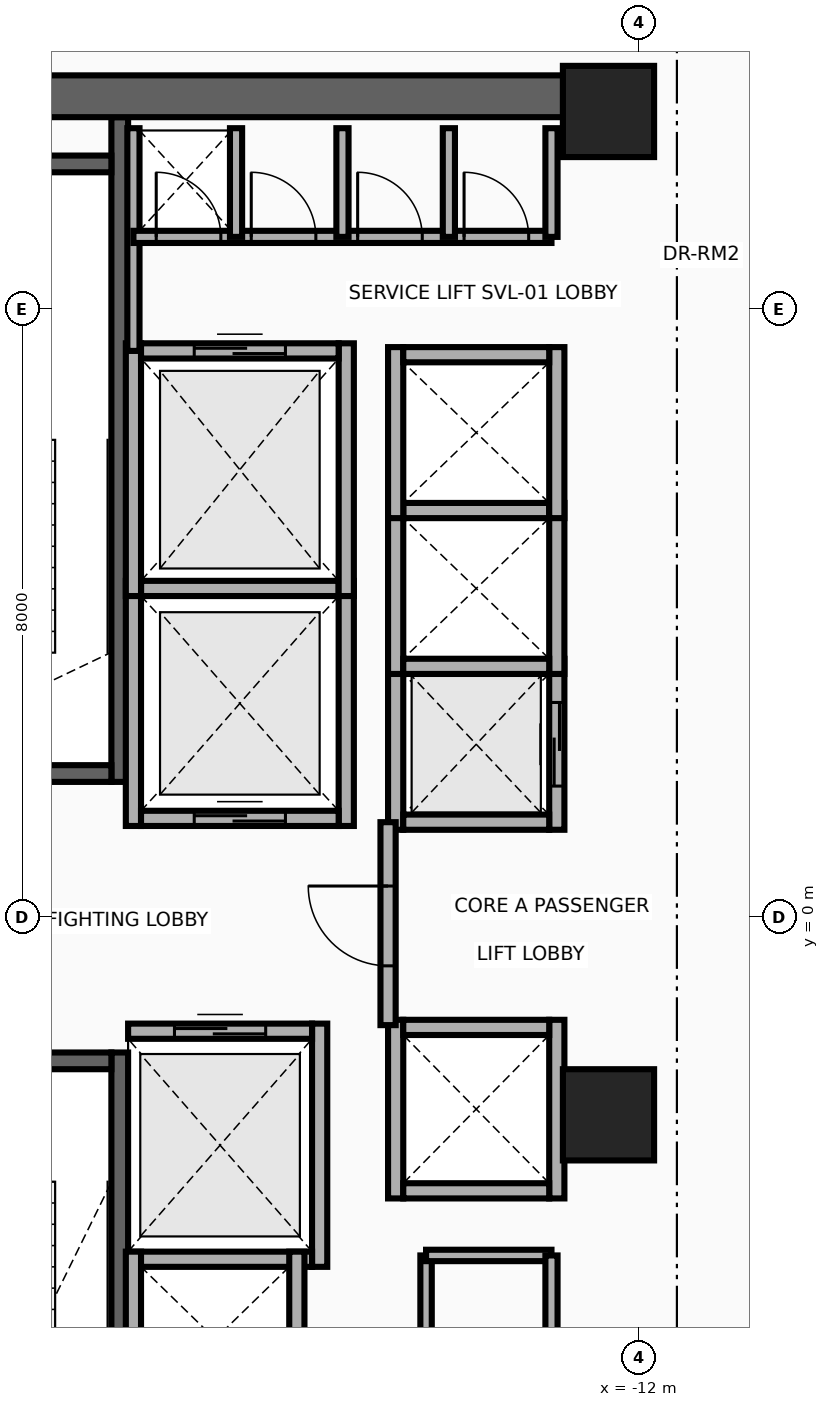
"""IFC4 building model, lengths in metres.
Left out: names, types, materials, properties, quantities, classifications, styles, units other than length and angle.
Written with IfcOpenShell. Run it as: python <this file> out.ifc"""

import sys

from ifc_helpers import new_model, si_unit, direction, frame, frame_2d, origin, origin_2d, place, context, subcontext, project, spatial, rectangle, extrude, source, transform, mapped, element, fill, save


model = new_model("IFC4")
c1 = context("Model", 3, precision=1e-05, world=origin(), true_north=direction((0.0, 1.0)))
c2 = subcontext(c1, "Body", "Model", "MODEL_VIEW")
j1 = project(units=[si_unit("LENGTHUNIT", "METRE"), si_unit("PLANEANGLEUNIT", "RADIAN")], contexts=[c1])
p1 = place(None, origin())
s1 = spatial("IfcSite", under=j1, at=p1, CompositionType="ELEMENT")
p2 = place(p1, origin())
s2 = spatial("IfcBuilding", under=s1, at=p2, CompositionType="ELEMENT")
p3 = place(p2, frame((0.0, 0.0, 168.6)))
s3 = spatial("IfcBuildingStorey", under=s2, at=p3, CompositionType="ELEMENT", Elevation=168.6)
p4 = place(p3, frame((-18.83, 1.78, 0.0), z_axis=(0.0, 0.0, 1.0), x_axis=(0.0, 1.0, 0.0)))
e1 = element("IfcWall", 1, at=p4, inside=s3, PredefinedType="SHEAR", context=c2, shape_type="SweptSolid", body=[
    extrude(rectangle(XDim=8.745, YDim=0.22, at=frame_2d((4.373, 0.0))), origin(), (0.0, 0.0, 1.0), 3.3),
])
p5 = place(p3, frame((-22.05, 1.89, 0.0), z_axis=(0.0, 0.0, 1.0), x_axis=(1.0, 0.0, 0.0)))
e2 = element("IfcWall", 2, at=p5, inside=s3, PredefinedType="SHEAR", context=c2, shape_type="SweptSolid", body=[
    extrude(rectangle(XDim=3.11, YDim=0.22, at=frame_2d((1.555, 0.0))), origin(), (0.0, 0.0, 1.0), 3.3),
])
p6 = place(p5, frame((1.0, 0.0, 0.0)))
e3 = element("IfcOpeningElement", 3, at=p6, cuts=e2, PredefinedType="OPENING", context=c2, shape_type="SweptSolid", body=[
    extrude(rectangle(XDim=1.1, YDim=2.15, at=frame_2d((0.55, 1.075))), frame((0.0, 0.125, 0.0), z_axis=(0.0, -1.0, 0.0), x_axis=(1.0, 0.0, 0.0)), (0.0, 0.0, 1.0), 0.25),
])
p7 = place(p3, frame((-22.05, 9.91, 0.0), z_axis=(0.0, 0.0, 1.0), x_axis=(1.0, 0.0, 0.0)))
e4 = element("IfcWall", 4, at=p7, inside=s3, PredefinedType="SHEAR", context=c2, shape_type="SweptSolid", body=[
    extrude(rectangle(XDim=3.11, YDim=0.22, at=frame_2d((1.555, 0.0))), origin(), (0.0, 0.0, 1.0), 3.3),
])
p8 = place(p3, frame((-18.83, -10.525, 0.0), z_axis=(0.0, 0.0, 1.0), x_axis=(0.0, 1.0, 0.0)))
e5 = element("IfcWall", 5, at=p8, inside=s3, PredefinedType="SHEAR", context=c2, shape_type="SweptSolid", body=[
    extrude(rectangle(XDim=8.745, YDim=0.22, at=frame_2d((4.373, 0.0))), origin(), (0.0, 0.0, 1.0), 3.3),
])
p9 = place(p3, frame((-22.05, -1.89, 0.0), z_axis=(0.0, 0.0, 1.0), x_axis=(1.0, 0.0, 0.0)))
e6 = element("IfcWall", 6, at=p9, inside=s3, PredefinedType="SHEAR", context=c2, shape_type="SweptSolid", body=[
    extrude(rectangle(XDim=3.11, YDim=0.22, at=frame_2d((1.555, 0.0))), origin(), (0.0, 0.0, 1.0), 3.3),
])
p10 = place(p9, frame((1.0, 0.0, 0.0)))
e7 = element("IfcOpeningElement", 7, at=p10, cuts=e6, PredefinedType="OPENING", context=c2, shape_type="SweptSolid", body=[
    extrude(rectangle(XDim=1.1, YDim=2.15, at=frame_2d((0.55, 1.075))), frame((0.0, 0.125, 0.0), z_axis=(0.0, -1.0, 0.0), x_axis=(1.0, 0.0, 0.0)), (0.0, 0.0, 1.0), 0.25),
])
p11 = place(p3, frame((-22.65, 10.8, 0.0), z_axis=(0.0, 0.0, 1.0), x_axis=(1.0, 0.0, 0.0)))
e8 = element("IfcWall", 8, at=p11, inside=s3, PredefinedType="SHEAR", context=c2, shape_type="SweptSolid", body=[
    extrude(rectangle(XDim=10.25, YDim=0.55, at=frame_2d((5.125, 0.0))), origin(), (0.0, 0.0, 1.0), 3.3),
])
m1 = source(origin(), c2, "Body", "SweptSolid", [
    extrude(rectangle(XDim=1.2, YDim=1.2, at=origin_2d()), origin(), (0.0, 0.0, 1.0), 3.7),
])
for number, where, z_axis, x_axis in (
    (9, (-12.4, -2.6, 0.0), (0.0, 0.0, 1.0), (1.0, 0.0, 0.0)),
    (10, (-12.4, 10.6, 0.0), (0.0, 0.0, 1.0), (1.0, 0.0, 0.0)),
):
    element("IfcColumn", number, at=place(p3, frame(where, z_axis=z_axis, x_axis=x_axis)), inside=s3, PredefinedType="COLUMN", context=c2, shape_type="MappedRepresentation", body=[
        mapped(m1, transform((0.0, 0.0, 0.0), x_axis=(1.0, 0.0, 0.0), y_axis=(0.0, 1.0, 0.0), z_axis=(0.0, 0.0, 1.0), scale=1.0)),
    ])
for number, where, z_axis, x_axis in (
    (11, (-18.65, 1.2, 0.0), (0.0, 0.0, 1.0), (0.0, 1.0, 0.0)),
    (12, (-15.85, 1.2, 0.0), (0.0, 0.0, 1.0), (0.0, 1.0, 0.0)),
):
    element("IfcWall", number, at=place(p3, frame(where, z_axis=z_axis, x_axis=x_axis)), inside=s3, PredefinedType="MOVABLE", context=c2, shape_type="SweptSolid", body=[
        extrude(rectangle(XDim=3.225, YDim=0.2, at=frame_2d((1.613, 0.0))), origin(), (0.0, 0.0, 1.0), 3.3),
    ])
p12 = place(p3, frame((-18.55, 1.3, 0.0), z_axis=(0.0, 0.0, 1.0), x_axis=(1.0, 0.0, 0.0)))
e13 = element("IfcWall", 13, at=p12, inside=s3, PredefinedType="MOVABLE", context=c2, shape_type="SweptSolid", body=[
    extrude(rectangle(XDim=2.6, YDim=0.2, at=frame_2d((1.3, 0.0))), origin(), (0.0, 0.0, 1.0), 3.3),
])
p13 = place(p12, frame((0.7, 0.0, 0.0)))
e14 = element("IfcOpeningElement", 14, at=p13, cuts=e13, PredefinedType="OPENING", context=c2, shape_type="SweptSolid", body=[
    extrude(rectangle(XDim=1.2, YDim=2.1, at=frame_2d((0.6, 1.05))), frame((0.0, 0.115, 0.0), z_axis=(0.0, -1.0, 0.0), x_axis=(1.0, 0.0, 0.0)), (0.0, 0.0, 1.0), 0.23),
])
p14 = place(p3, frame((-18.55, 4.325, 0.0), z_axis=(0.0, 0.0, 1.0), x_axis=(1.0, 0.0, 0.0)))
e15 = element("IfcWall", 15, at=p14, inside=s3, PredefinedType="MOVABLE", context=c2, shape_type="SweptSolid", body=[
    extrude(rectangle(XDim=2.6, YDim=0.2, at=frame_2d((1.3, 0.0))), origin(), (0.0, 0.0, 1.0), 3.3),
])
p15 = place(p3, frame((-16.2, -4.6, 0.0), z_axis=(0.0, 0.0, 1.0), x_axis=(0.0, 1.0, 0.0)))
e16 = element("IfcWall", 16, at=p15, inside=s3, PredefinedType="MOVABLE", context=c2, shape_type="SweptSolid", body=[
    extrude(rectangle(XDim=3.2, YDim=0.2, at=frame_2d((1.6, 0.0))), origin(), (0.0, 0.0, 1.0), 3.3),
])
p16 = place(p3, frame((-18.72, -4.5, 0.0), z_axis=(0.0, 0.0, 1.0), x_axis=(1.0, 0.0, 0.0)))
e17 = element("IfcWall", 17, at=p16, inside=s3, PredefinedType="MOVABLE", context=c2, shape_type="SweptSolid", body=[
    extrude(rectangle(XDim=2.42, YDim=0.2, at=frame_2d((1.21, 0.0))), origin(), (0.0, 0.0, 1.0), 3.3),
])
p17 = place(p3, frame((-18.72, -1.5, 0.0), z_axis=(0.0, 0.0, 1.0), x_axis=(1.0, 0.0, 0.0)))
e18 = element("IfcWall", 18, at=p17, inside=s3, PredefinedType="MOVABLE", context=c2, shape_type="SweptSolid", body=[
    extrude(rectangle(XDim=2.42, YDim=0.2, at=frame_2d((1.21, 0.0))), origin(), (0.0, 0.0, 1.0), 3.3),
])
p18 = place(p17, frame((0.61, 0.0, 0.0)))
e19 = element("IfcOpeningElement", 19, at=p18, cuts=e18, PredefinedType="OPENING", context=c2, shape_type="SweptSolid", body=[
    extrude(rectangle(XDim=1.2, YDim=2.1, at=frame_2d((0.6, 1.05))), frame((0.0, 0.115, 0.0), z_axis=(0.0, -1.0, 0.0), x_axis=(1.0, 0.0, 0.0)), (0.0, 0.0, 1.0), 0.23),
])
for number, where, z_axis, x_axis in (
    (20, (-18.65, 4.225, 0.0), (0.0, 0.0, 1.0), (0.0, 1.0, 0.0)),
    (21, (-15.85, 4.225, 0.0), (0.0, 0.0, 1.0), (0.0, 1.0, 0.0)),
):
    element("IfcWall", number, at=place(p3, frame(where, z_axis=z_axis, x_axis=x_axis)), inside=s3, PredefinedType="MOVABLE", context=c2, shape_type="SweptSolid", body=[
        extrude(rectangle(XDim=3.325, YDim=0.2, at=frame_2d((1.663, 0.0))), origin(), (0.0, 0.0, 1.0), 3.3),
    ])
p19 = place(p3, frame((-18.55, 7.45, 0.0), z_axis=(0.0, 0.0, 1.0), x_axis=(1.0, 0.0, 0.0)))
e22 = element("IfcWall", 22, at=p19, inside=s3, PredefinedType="MOVABLE", context=c2, shape_type="SweptSolid", body=[
    extrude(rectangle(XDim=2.6, YDim=0.2, at=frame_2d((1.3, 0.0))), origin(), (0.0, 0.0, 1.0), 3.3),
])
p20 = place(p19, frame((0.7, 0.0, 0.0)))
e23 = element("IfcOpeningElement", 23, at=p20, cuts=e22, PredefinedType="OPENING", context=c2, shape_type="SweptSolid", body=[
    extrude(rectangle(XDim=1.2, YDim=2.1, at=frame_2d((0.6, 1.05))), frame((0.0, 0.115, 0.0), z_axis=(0.0, -1.0, 0.0), x_axis=(1.0, 0.0, 0.0)), (0.0, 0.0, 1.0), 0.23),
])
p21 = place(p3, frame((-15.2, 1.15, 0.0), z_axis=(0.0, 0.0, 1.0), x_axis=(0.0, 1.0, 0.0)))
e24 = element("IfcWall", 24, at=p21, inside=s3, PredefinedType="MOVABLE", context=c2, shape_type="SweptSolid", body=[
    extrude(rectangle(XDim=2.25, YDim=0.2, at=frame_2d((1.125, 0.0))), origin(), (0.0, 0.0, 1.0), 3.3),
])
p22 = place(p3, frame((-13.08, 1.15, 0.0), z_axis=(0.0, 0.0, 1.0), x_axis=(0.0, 1.0, 0.0)))
e25 = element("IfcWall", 25, at=p22, inside=s3, PredefinedType="MOVABLE", context=c2, shape_type="SweptSolid", body=[
    extrude(rectangle(XDim=2.25, YDim=0.2, at=frame_2d((1.125, 0.0))), origin(), (0.0, 0.0, 1.0), 3.3),
])
p23 = place(p22, frame((0.575, 0.0, 0.0)))
e26 = element("IfcOpeningElement", 26, at=p23, cuts=e25, PredefinedType="OPENING", context=c2, shape_type="SweptSolid", body=[
    extrude(rectangle(XDim=1.1, YDim=2.1, at=frame_2d((0.55, 1.05))), frame((0.0, 0.115, 0.0), z_axis=(0.0, -1.0, 0.0), x_axis=(1.0, 0.0, 0.0)), (0.0, 0.0, 1.0), 0.23),
])
p24 = place(p3, frame((-15.1, 1.25, 0.0), z_axis=(0.0, 0.0, 1.0), x_axis=(1.0, 0.0, 0.0)))
e27 = element("IfcWall", 27, at=p24, inside=s3, PredefinedType="MOVABLE", context=c2, shape_type="SweptSolid", body=[
    extrude(rectangle(XDim=1.92, YDim=0.2, at=frame_2d((0.96, 0.0))), origin(), (0.0, 0.0, 1.0), 3.3),
])
for number, where, z_axis, x_axis in (
    (28, (-15.2, 3.2, 0.0), (0.0, 0.0, 1.0), (0.0, 1.0, 0.0)),
    (29, (-13.08, 3.2, 0.0), (0.0, 0.0, 1.0), (0.0, 1.0, 0.0)),
):
    element("IfcWall", number, at=place(p3, frame(where, z_axis=z_axis, x_axis=x_axis)), inside=s3, PredefinedType="MOVABLE", context=c2, shape_type="SweptSolid", body=[
        extrude(rectangle(XDim=2.25, YDim=0.2, at=frame_2d((1.125, 0.0))), origin(), (0.0, 0.0, 1.0), 3.3),
    ])
for number, where, z_axis, x_axis in (
    (30, (-15.1, 3.3, 0.0), (0.0, 0.0, 1.0), (1.0, 0.0, 0.0)),
    (31, (-15.1, 5.35, 0.0), (0.0, 0.0, 1.0), (1.0, 0.0, 0.0)),
):
    element("IfcWall", number, at=place(p3, frame(where, z_axis=z_axis, x_axis=x_axis)), inside=s3, PredefinedType="MOVABLE", context=c2, shape_type="SweptSolid", body=[
        extrude(rectangle(XDim=1.92, YDim=0.2, at=frame_2d((0.96, 0.0))), origin(), (0.0, 0.0, 1.0), 3.3),
    ])
for number, where, z_axis, x_axis in (
    (32, (-15.2, 5.25, 0.0), (0.0, 0.0, 1.0), (0.0, 1.0, 0.0)),
    (33, (-13.08, 5.25, 0.0), (0.0, 0.0, 1.0), (0.0, 1.0, 0.0)),
):
    element("IfcWall", number, at=place(p3, frame(where, z_axis=z_axis, x_axis=x_axis)), inside=s3, PredefinedType="MOVABLE", context=c2, shape_type="SweptSolid", body=[
        extrude(rectangle(XDim=2.25, YDim=0.2, at=frame_2d((1.125, 0.0))), origin(), (0.0, 0.0, 1.0), 3.3),
    ])
p25 = place(p3, frame((-15.1, 7.4, 0.0), z_axis=(0.0, 0.0, 1.0), x_axis=(1.0, 0.0, 0.0)))
e34 = element("IfcWall", 34, at=p25, inside=s3, PredefinedType="MOVABLE", context=c2, shape_type="SweptSolid", body=[
    extrude(rectangle(XDim=1.92, YDim=0.2, at=frame_2d((0.96, 0.0))), origin(), (0.0, 0.0, 1.0), 3.3),
])
for number, where, z_axis, x_axis in (
    (35, (-18.65, -6.7, 0.0), (0.0, 0.0, 1.0), (0.0, 1.0, 0.0)),
    (36, (-16.5, -6.7, 0.0), (0.0, 0.0, 1.0), (0.0, 1.0, 0.0)),
):
    element("IfcWall", number, at=place(p3, frame(where, z_axis=z_axis, x_axis=x_axis)), inside=s3, PredefinedType="MOVABLE", context=c2, shape_type="SweptSolid", body=[
        extrude(rectangle(XDim=2.3, YDim=0.2, at=frame_2d((1.15, 0.0))), origin(), (0.0, 0.0, 1.0), 3.3),
    ])
for number, where, z_axis, x_axis in (
    (37, (-15.2, -3.7, 0.0), (0.0, 0.0, 1.0), (0.0, 1.0, 0.0)),
    (38, (-13.08, -3.7, 0.0), (0.0, 0.0, 1.0), (0.0, 1.0, 0.0)),
):
    element("IfcWall", number, at=place(p3, frame(where, z_axis=z_axis, x_axis=x_axis)), inside=s3, PredefinedType="MOVABLE", context=c2, shape_type="SweptSolid", body=[
        extrude(rectangle(XDim=2.35, YDim=0.2, at=frame_2d((1.175, 0.0))), origin(), (0.0, 0.0, 1.0), 3.3),
    ])
for number, where, z_axis, x_axis in (
    (39, (-15.1, -3.6, 0.0), (0.0, 0.0, 1.0), (1.0, 0.0, 0.0)),
    (40, (-15.1, -1.45, 0.0), (0.0, 0.0, 1.0), (1.0, 0.0, 0.0)),
):
    element("IfcWall", number, at=place(p3, frame(where, z_axis=z_axis, x_axis=x_axis)), inside=s3, PredefinedType="MOVABLE", context=c2, shape_type="SweptSolid", body=[
        extrude(rectangle(XDim=1.92, YDim=0.2, at=frame_2d((0.96, 0.0))), origin(), (0.0, 0.0, 1.0), 3.3),
    ])
p26 = place(p3, frame((-15.3, -1.42, 0.0), z_axis=(0.0, 0.0, 1.0), x_axis=(0.0, 1.0, 0.0)))
e41 = element("IfcWall", 41, at=p26, inside=s3, PredefinedType="PARTITIONING", context=c2, shape_type="SweptSolid", body=[
    extrude(rectangle(XDim=2.67, YDim=0.2, at=frame_2d((1.335, 0.0))), origin(), (0.0, 0.0, 1.0), 3.3),
])
p27 = place(p26, frame((0.78, 0.0, 0.0)))
e42 = element("IfcOpeningElement", 42, at=p27, cuts=e41, PredefinedType="OPENING", context=c2, shape_type="SweptSolid", body=[
    extrude(rectangle(XDim=1.05, YDim=2.15, at=frame_2d((0.525, 1.075))), frame((0.0, 0.115, 0.0), z_axis=(0.0, -1.0, 0.0), x_axis=(1.0, 0.0, 0.0)), (0.0, 0.0, 1.0), 0.23),
])
p28 = place(p3, frame((-18.65, 7.45, 0.0), z_axis=(0.0, 0.0, 1.0), x_axis=(0.0, 1.0, 0.0)))
e43 = element("IfcWall", 43, at=p28, inside=s3, PredefinedType="PARTITIONING", context=c2, shape_type="SweptSolid", body=[
    extrude(rectangle(XDim=2.93, YDim=0.16, at=frame_2d((1.465, 0.0))), origin(), (0.0, 0.0, 1.0), 2.085),
])
p29 = place(p3, frame((-18.65, 8.95, 0.0), z_axis=(0.0, 0.0, 1.0), x_axis=(1.0, 0.0, 0.0)))
e44 = element("IfcWall", 44, at=p29, inside=s3, PredefinedType="PARTITIONING", context=c2, shape_type="SweptSolid", body=[
    extrude(rectangle(XDim=5.5, YDim=0.16, at=frame_2d((2.75, 0.0))), origin(), (0.0, 0.0, 1.0), 3.3),
])
p30 = place(p29, frame((0.3, 0.0, 0.0)))
e45 = element("IfcOpeningElement", 45, at=p30, cuts=e44, PredefinedType="OPENING", context=c2, shape_type="SweptSolid", body=[
    extrude(rectangle(XDim=0.85, YDim=2.05, at=frame_2d((0.425, 1.025))), frame((0.0, 0.095, 0.0), z_axis=(0.0, -1.0, 0.0), x_axis=(1.0, 0.0, 0.0)), (0.0, 0.0, 1.0), 0.19),
])
p31 = place(p29, frame((1.55, 0.0, 0.0)))
e46 = element("IfcOpeningElement", 46, at=p31, cuts=e44, PredefinedType="OPENING", context=c2, shape_type="SweptSolid", body=[
    extrude(rectangle(XDim=0.85, YDim=2.05, at=frame_2d((0.425, 1.025))), frame((0.0, 0.095, 0.0), z_axis=(0.0, -1.0, 0.0), x_axis=(1.0, 0.0, 0.0)), (0.0, 0.0, 1.0), 0.19),
])
p32 = place(p29, frame((2.95, 0.0, 0.0)))
e47 = element("IfcOpeningElement", 47, at=p32, cuts=e44, PredefinedType="OPENING", context=c2, shape_type="SweptSolid", body=[
    extrude(rectangle(XDim=0.85, YDim=2.05, at=frame_2d((0.425, 1.025))), frame((0.0, 0.095, 0.0), z_axis=(0.0, -1.0, 0.0), x_axis=(1.0, 0.0, 0.0)), (0.0, 0.0, 1.0), 0.19),
])
p33 = place(p29, frame((4.35, 0.0, 0.0)))
e48 = element("IfcOpeningElement", 48, at=p33, cuts=e44, PredefinedType="OPENING", context=c2, shape_type="SweptSolid", body=[
    extrude(rectangle(XDim=0.85, YDim=2.05, at=frame_2d((0.425, 1.025))), frame((0.0, 0.095, 0.0), z_axis=(0.0, -1.0, 0.0), x_axis=(1.0, 0.0, 0.0)), (0.0, 0.0, 1.0), 0.19),
])
for number, where, z_axis, x_axis in (
    (49, (-13.15, 8.95, 0.0), (0.0, 0.0, 1.0), (0.0, 1.0, 0.0)),
    (50, (-17.3, 8.95, 0.0), (0.0, 0.0, 1.0), (0.0, 1.0, 0.0)),
    (51, (-15.9, 8.95, 0.0), (0.0, 0.0, 1.0), (0.0, 1.0, 0.0)),
    (52, (-14.5, 8.95, 0.0), (0.0, 0.0, 1.0), (0.0, 1.0, 0.0)),
):
    element("IfcWall", number, at=place(p3, frame(where, z_axis=z_axis, x_axis=x_axis)), inside=s3, PredefinedType="PARTITIONING", context=c2, shape_type="SweptSolid", body=[
        extrude(rectangle(XDim=1.43, YDim=0.16, at=frame_2d((0.715, 0.0))), origin(), (0.0, 0.0, 1.0), 2.085),
    ])
p34 = place(p3, frame((-14.8, -6.58, 0.0), z_axis=(0.0, 0.0, 1.0), x_axis=(0.0, 1.0, 0.0)))
e53 = element("IfcWall", 53, at=p34, inside=s3, PredefinedType="PARTITIONING", context=c2, shape_type="SweptSolid", body=[
    extrude(rectangle(XDim=2.13, YDim=0.15, at=frame_2d((1.065, 0.0))), origin(), (0.0, 0.0, 1.0), 3.3),
])
p35 = place(p3, frame((-14.8, -4.45, 0.0), z_axis=(0.0, 0.0, 1.0), x_axis=(1.0, 0.0, 0.0)))
e54 = element("IfcWall", 54, at=p35, inside=s3, PredefinedType="PARTITIONING", context=c2, shape_type="SweptSolid", body=[
    extrude(rectangle(XDim=1.65, YDim=0.15, at=frame_2d((0.825, 0.0))), origin(), (0.0, 0.0, 1.0), 3.3),
])
p36 = place(p3, frame((-13.15, -6.58, 0.0), z_axis=(0.0, 0.0, 1.0), x_axis=(0.0, 1.0, 0.0)))
e55 = element("IfcWall", 55, at=p36, inside=s3, PredefinedType="PARTITIONING", context=c2, shape_type="SweptSolid", body=[
    extrude(rectangle(XDim=2.13, YDim=0.16, at=frame_2d((1.065, 0.0))), origin(), (0.0, 0.0, 1.0), 3.3),
])
p37 = place(p13, origin())
e56 = element("IfcDoor", 56, at=p37, inside=s3, OperationType="DOUBLE_DOOR_SLIDING", PredefinedType="DOOR", context=c2, shape_type="SweptSolid", body=[
    extrude(rectangle(XDim=1.2, YDim=2.1, at=frame_2d((0.6, 1.05))), frame((0.0, 0.025, 0.0), z_axis=(0.0, -1.0, 0.0), x_axis=(1.0, 0.0, 0.0)), (0.0, 0.0, 1.0), 0.05),
])
fill(e14, e56)
p38 = place(p18, origin())
e57 = element("IfcDoor", 57, at=p38, inside=s3, OperationType="DOUBLE_DOOR_SLIDING", PredefinedType="DOOR", context=c2, shape_type="SweptSolid", body=[
    extrude(rectangle(XDim=1.2, YDim=2.1, at=frame_2d((0.6, 1.05))), frame((0.0, 0.025, 0.0), z_axis=(0.0, -1.0, 0.0), x_axis=(1.0, 0.0, 0.0)), (0.0, 0.0, 1.0), 0.05),
])
fill(e19, e57)
p39 = place(p20, origin())
e58 = element("IfcDoor", 58, at=p39, inside=s3, OperationType="DOUBLE_DOOR_SLIDING", PredefinedType="DOOR", context=c2, shape_type="SweptSolid", body=[
    extrude(rectangle(XDim=1.2, YDim=2.1, at=frame_2d((0.6, 1.05))), frame((0.0, 0.025, 0.0), z_axis=(0.0, -1.0, 0.0), x_axis=(1.0, 0.0, 0.0)), (0.0, 0.0, 1.0), 0.05),
])
fill(e23, e58)
p40 = place(p23, origin())
e59 = element("IfcDoor", 59, at=p40, inside=s3, OperationType="DOUBLE_DOOR_SLIDING", PredefinedType="DOOR", context=c2, shape_type="SweptSolid", body=[
    extrude(rectangle(XDim=1.1, YDim=2.1, at=frame_2d((0.55, 1.05))), frame((0.0, 0.025, 0.0), z_axis=(0.0, -1.0, 0.0), x_axis=(1.0, 0.0, 0.0)), (0.0, 0.0, 1.0), 0.05),
])
fill(e26, e59)
p41 = place(p27, origin())
e60 = element("IfcDoor", 60, at=p41, inside=s3, OperationType="SINGLE_SWING_RIGHT", PredefinedType="DOOR", context=c2, shape_type="SweptSolid", body=[
    extrude(rectangle(XDim=1.05, YDim=2.15, at=frame_2d((0.525, 1.075))), frame((0.0, 0.025, 0.0), z_axis=(0.0, -1.0, 0.0), x_axis=(1.0, 0.0, 0.0)), (0.0, 0.0, 1.0), 0.05),
])
fill(e42, e60)
p42 = place(p30, origin())
e61 = element("IfcDoor", 61, at=p42, inside=s3, OperationType="SINGLE_SWING_LEFT", PredefinedType="DOOR", context=c2, shape_type="SweptSolid", body=[
    extrude(rectangle(XDim=0.85, YDim=2.05, at=frame_2d((0.425, 1.025))), frame((0.0, 0.025, 0.0), z_axis=(0.0, -1.0, 0.0), x_axis=(1.0, 0.0, 0.0)), (0.0, 0.0, 1.0), 0.05),
])
fill(e45, e61)
p43 = place(p31, origin())
e62 = element("IfcDoor", 62, at=p43, inside=s3, OperationType="SINGLE_SWING_RIGHT", PredefinedType="DOOR", context=c2, shape_type="SweptSolid", body=[
    extrude(rectangle(XDim=0.85, YDim=2.05, at=frame_2d((0.425, 1.025))), frame((0.0, 0.025, 0.0), z_axis=(0.0, -1.0, 0.0), x_axis=(1.0, 0.0, 0.0)), (0.0, 0.0, 1.0), 0.05),
])
fill(e46, e62)
p44 = place(p32, origin())
e63 = element("IfcDoor", 63, at=p44, inside=s3, OperationType="SINGLE_SWING_LEFT", PredefinedType="DOOR", context=c2, shape_type="SweptSolid", body=[
    extrude(rectangle(XDim=0.85, YDim=2.05, at=frame_2d((0.425, 1.025))), frame((0.0, 0.025, 0.0), z_axis=(0.0, -1.0, 0.0), x_axis=(1.0, 0.0, 0.0)), (0.0, 0.0, 1.0), 0.05),
])
fill(e47, e63)
p45 = place(p33, origin())
e64 = element("IfcDoor", 64, at=p45, inside=s3, OperationType="SINGLE_SWING_RIGHT", PredefinedType="DOOR", context=c2, shape_type="SweptSolid", body=[
    extrude(rectangle(XDim=0.85, YDim=2.05, at=frame_2d((0.425, 1.025))), frame((0.0, 0.025, 0.0), z_axis=(0.0, -1.0, 0.0), x_axis=(1.0, 0.0, 0.0)), (0.0, 0.0, 1.0), 0.05),
])
fill(e48, e64)
save(model, sys.argv[1])
